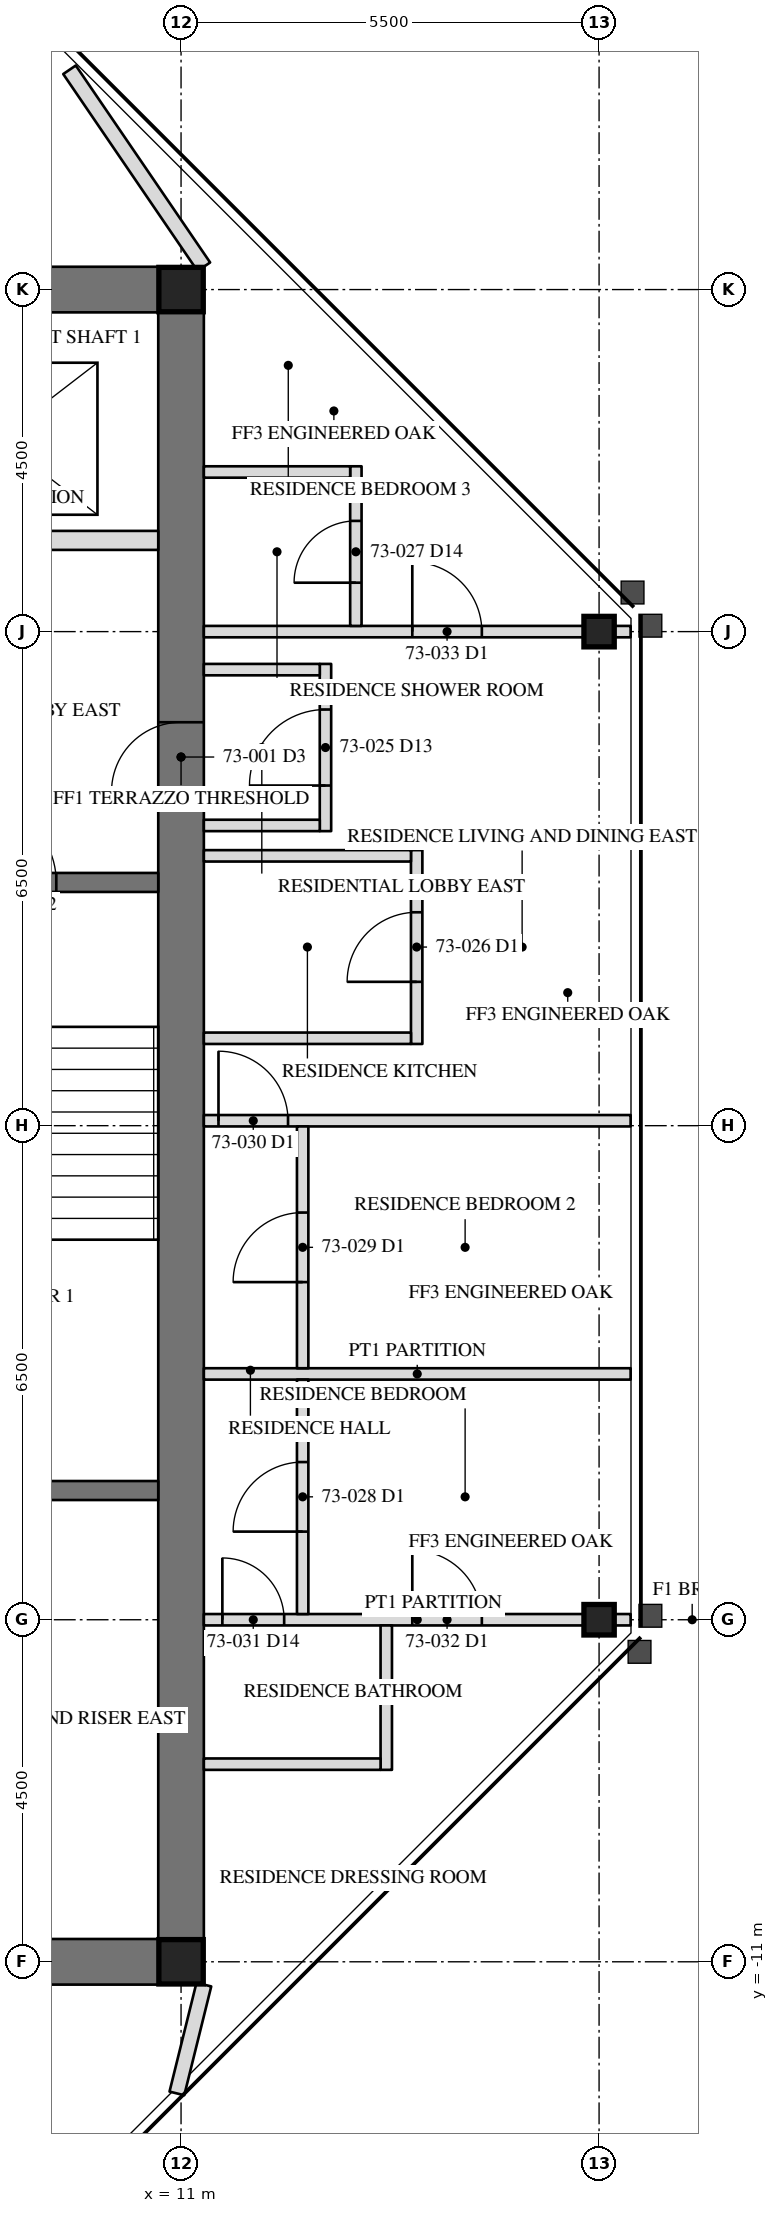
"""IFC4 building model, lengths in metres.
Left out: names, types, materials, properties, quantities, classifications, styles, units other than length and angle.
Written with IfcOpenShell. Run it as: python <this file> out.ifc"""

import sys

from ifc_helpers import new_model, si_unit, direction, frame, frame_2d, origin, origin_2d, place, context, subcontext, project, spatial, rectangle, hollow_rectangle, i_section, extrude, element, fill, save


model = new_model("IFC4")
c1 = context("Model", 3, precision=1e-05, world=origin(), true_north=direction((0.0, 1.0)))
c2 = subcontext(c1, "Body", "Model", "MODEL_VIEW")
j1 = project(units=[si_unit("LENGTHUNIT", "METRE"), si_unit("PLANEANGLEUNIT", "RADIAN")], contexts=[c1])
p1 = place(None, origin())
s1 = spatial("IfcSite", under=j1, at=p1, CompositionType="ELEMENT")
p2 = place(p1, origin())
s2 = spatial("IfcBuilding", under=s1, at=p2, CompositionType="ELEMENT")
p3 = place(p2, frame((0.0, 0.0, 295.6)))
s3 = spatial("IfcBuildingStorey", under=s2, at=p3, CompositionType="ELEMENT", Elevation=295.6)
for number, where, z_axis, x_axis in (
    (1, (16.5, -6.5, 0.0), (0.0, 0.0, 1.0), (0.0, 1.0, 0.0)),
    (2, (16.5, 6.5, 0.0), (0.0, 0.0, 1.0), (0.0, 1.0, 0.0)),
):
    element("IfcColumn", number, at=place(p3, frame(where, z_axis=z_axis, x_axis=x_axis)), inside=s3, PredefinedType="COLUMN", context=c2, shape_type="SweptSolid", body=[
        extrude(i_section(OverallWidth=0.401, OverallDepth=0.399, WebThickness=0.025, FlangeThickness=0.04, at=origin_2d()), origin(), (0.0, 0.0, 1.0), 3.6),
    ])
p4 = place(p3, frame((11.0, -11.0, 0.0), z_axis=(0.0, 0.0, 1.0), x_axis=(0.0, 1.0, 0.0)))
e3 = element("IfcWall", 3, at=p4, inside=s3, PredefinedType="SHEAR", context=c2, shape_type="SweptSolid", body=[
    extrude(rectangle(XDim=22.0, YDim=0.6, at=frame_2d((11.0, 0.0))), origin(), (0.0, 0.0, 1.0), 3.6),
])
p5 = place(p4, frame((15.393, 0.0, 0.0)))
e4 = element("IfcOpeningElement", 4, at=p5, cuts=e3, PredefinedType="OPENING", context=c2, shape_type="SweptSolid", body=[
    extrude(rectangle(XDim=0.915, YDim=2.134, at=frame_2d((0.458, 1.067))), frame((0.0, 0.31, 0.0), z_axis=(0.0, -1.0, 0.0), x_axis=(1.0, 0.0, 0.0)), (0.0, 0.0, 1.0), 0.62),
])
for number, where, z_axis, x_axis in (
    (5, (11.0, 11.0, 0.0), (0.0, 0.0, 1.0), (-1.0, 0.0, 0.0)),
    (6, (6.5, -11.0, 0.0), (0.0, 0.0, 1.0), (1.0, 0.0, 0.0)),
):
    element("IfcWall", number, at=place(p3, frame(where, z_axis=z_axis, x_axis=x_axis)), inside=s3, PredefinedType="SHEAR", context=c2, shape_type="SweptSolid", body=[
        extrude(rectangle(XDim=4.5, YDim=0.6, at=frame_2d((2.25, 0.0))), origin(), (0.0, 0.0, 1.0), 3.6),
    ])
for number, where, z_axis, x_axis in (
    (7, (11.0, 11.0, 0.0), (0.0, 0.0, 1.0), (1.0, 0.0, 0.0)),
    (8, (11.0, -11.0, 0.0), (0.0, 0.0, 1.0), (1.0, 0.0, 0.0)),
):
    element("IfcColumn", number, at=place(p3, frame(where, z_axis=z_axis, x_axis=x_axis)), inside=s3, PredefinedType="COLUMN", context=c2, shape_type="SweptSolid", body=[
        extrude(hollow_rectangle(XDim=0.584, YDim=0.584, WallThickness=0.051, at=origin_2d()), origin(), (0.0, 0.0, 1.0), 3.6),
    ])
p6 = place(p3, frame((6.95, -4.8, 0.0), z_axis=(0.0, 0.0, 1.0), x_axis=(1.0, 0.0, 0.0)))
e9 = element("IfcWall", 9, at=p6, inside=s3, PredefinedType="SOLIDWALL", context=c2, shape_type="SweptSolid", body=[
    extrude(rectangle(XDim=3.75, YDim=0.25, at=frame_2d((1.875, 0.0))), origin(), (0.0, 0.0, 1.0), 3.41),
])
p7 = place(p3, frame((6.95, 3.2, 0.0), z_axis=(0.0, 0.0, 1.0), x_axis=(1.0, 0.0, 0.0)))
e10 = element("IfcWall", 10, at=p7, inside=s3, PredefinedType="SOLIDWALL", context=c2, shape_type="SweptSolid", body=[
    extrude(rectangle(XDim=3.75, YDim=0.25, at=frame_2d((1.875, 0.0))), origin(), (0.0, 0.0, 1.0), 3.41),
])
p8 = place(p7, frame((1.342, 0.0, 0.0)))
e11 = element("IfcOpeningElement", 11, at=p8, cuts=e10, PredefinedType="OPENING", context=c2, shape_type="SweptSolid", body=[
    extrude(rectangle(XDim=1.067, YDim=2.134, at=frame_2d((0.533, 1.067))), frame((0.0, 0.135, 0.0), z_axis=(0.0, -1.0, 0.0), x_axis=(1.0, 0.0, 0.0)), (0.0, 0.0, 1.0), 0.27),
])
p9 = place(p3, frame((6.95, 7.7, 0.0), z_axis=(0.0, 0.0, 1.0), x_axis=(1.0, 0.0, 0.0)))
e12 = element("IfcWall", 12, at=p9, inside=s3, PredefinedType="PARTITIONING", context=c2, shape_type="SweptSolid", body=[
    extrude(rectangle(XDim=3.75, YDim=0.25, at=frame_2d((1.875, 0.0))), origin(), (0.0, 0.0, 1.0), 3.41),
])
p10 = place(p9, frame((0.45, 0.0, 0.0)))
e13 = element("IfcOpeningElement", 13, at=p10, cuts=e12, PredefinedType="OPENING", context=c2, shape_type="SweptSolid", body=[
    extrude(rectangle(XDim=1.219, YDim=2.134, at=frame_2d((0.609, 1.067))), frame((0.0, 0.135, 0.0), z_axis=(0.0, -1.0, 0.0), x_axis=(1.0, 0.0, 0.0)), (0.0, 0.0, 1.0), 0.27),
])
p11 = place(p3, frame((11.3, 11.3, 0.0), z_axis=(0.0, 0.0, 1.0), x_axis=(-0.563469639691, 0.826136771453, 0.0)))
e14 = element("IfcWall", 14, at=p11, inside=s3, PredefinedType="PARTITIONING", context=c2, shape_type="SweptSolid", body=[
    extrude(rectangle(XDim=3.137, YDim=0.2, at=frame_2d((1.568, 0.0))), origin(), (0.0, 0.0, 1.0), 2.704),
])
p12 = place(p3, frame((11.3, -11.3, 0.0), z_axis=(0.0, 0.0, 1.0), x_axis=(-0.24050983258, -0.970646702169, 0.0)))
e15 = element("IfcWall", 15, at=p12, inside=s3, PredefinedType="PARTITIONING", context=c2, shape_type="SweptSolid", body=[
    extrude(rectangle(XDim=1.475, YDim=0.2, at=frame_2d((0.737, 0.0))), origin(), (0.0, 0.0, 1.0), 3.41),
])
p13 = place(p3, frame((11.3, -6.5, 0.0), z_axis=(0.0, 0.0, 1.0), x_axis=(1.0, 0.0, 0.0)))
e16 = element("IfcWall", 16, at=p13, inside=s3, PredefinedType="PARTITIONING", context=c2, shape_type="SweptSolid", body=[
    extrude(rectangle(XDim=5.615, YDim=0.15, at=frame_2d((2.808, 0.0))), origin(), (0.0, 0.0, 1.0), 2.966),
])
p14 = place(p13, frame((0.243, 0.0, 0.0)))
e17 = element("IfcOpeningElement", 17, at=p14, cuts=e16, PredefinedType="OPENING", context=c2, shape_type="SweptSolid", body=[
    extrude(rectangle(XDim=0.813, YDim=2.032, at=frame_2d((0.406, 1.016))), frame((0.0, 0.085, 0.0), z_axis=(0.0, -1.0, 0.0), x_axis=(1.0, 0.0, 0.0)), (0.0, 0.0, 1.0), 0.17),
])
p15 = place(p13, frame((2.742, 0.0, 0.0)))
e18 = element("IfcOpeningElement", 18, at=p15, cuts=e16, PredefinedType="OPENING", context=c2, shape_type="SweptSolid", body=[
    extrude(rectangle(XDim=0.915, YDim=2.134, at=frame_2d((0.458, 1.067))), frame((0.0, 0.085, 0.0), z_axis=(0.0, -1.0, 0.0), x_axis=(1.0, 0.0, 0.0)), (0.0, 0.0, 1.0), 0.17),
])
p16 = place(p3, frame((11.3, -3.266, 0.0), z_axis=(0.0, 0.0, 1.0), x_axis=(1.0, 0.0, 0.0)))
e19 = element("IfcWall", 19, at=p16, inside=s3, PredefinedType="PARTITIONING", context=c2, shape_type="SweptSolid", body=[
    extrude(rectangle(XDim=5.615, YDim=0.15, at=frame_2d((2.808, 0.0))), origin(), (0.0, 0.0, 1.0), 2.709),
])
p17 = place(p3, frame((11.3, 0.065, 0.0), z_axis=(0.0, 0.0, 1.0), x_axis=(1.0, 0.0, 0.0)))
e20 = element("IfcWall", 20, at=p17, inside=s3, PredefinedType="PARTITIONING", context=c2, shape_type="SweptSolid", body=[
    extrude(rectangle(XDim=5.615, YDim=0.15, at=frame_2d((2.808, 0.0))), origin(), (0.0, 0.0, 1.0), 2.709),
])
p18 = place(p17, frame((0.192, 0.0, 0.0)))
e21 = element("IfcOpeningElement", 21, at=p18, cuts=e20, PredefinedType="OPENING", context=c2, shape_type="SweptSolid", body=[
    extrude(rectangle(XDim=0.915, YDim=2.134, at=frame_2d((0.458, 1.067))), frame((0.0, 0.085, 0.0), z_axis=(0.0, -1.0, 0.0), x_axis=(1.0, 0.0, 0.0)), (0.0, 0.0, 1.0), 0.17),
])
p19 = place(p3, frame((11.3, 6.5, 0.0), z_axis=(0.0, 0.0, 1.0), x_axis=(1.0, 0.0, 0.0)))
e22 = element("IfcWall", 22, at=p19, inside=s3, PredefinedType="PARTITIONING", context=c2, shape_type="SweptSolid", body=[
    extrude(rectangle(XDim=5.615, YDim=0.15, at=frame_2d((2.808, 0.0))), origin(), (0.0, 0.0, 1.0), 2.966),
])
p20 = place(p19, frame((2.742, 0.0, 0.0)))
e23 = element("IfcOpeningElement", 23, at=p20, cuts=e22, PredefinedType="OPENING", context=c2, shape_type="SweptSolid", body=[
    extrude(rectangle(XDim=0.915, YDim=2.134, at=frame_2d((0.458, 1.067))), frame((0.0, 0.085, 0.0), z_axis=(0.0, -1.0, 0.0), x_axis=(1.0, 0.0, 0.0)), (0.0, 0.0, 1.0), 0.17),
])
p21 = place(p3, frame((12.9, 3.875, 0.0), z_axis=(0.0, 0.0, 1.0), x_axis=(0.0, 1.0, 0.0)))
e24 = element("IfcWall", 24, at=p21, inside=s3, PredefinedType="PARTITIONING", context=c2, shape_type="SweptSolid", body=[
    extrude(rectangle(XDim=2.2, YDim=0.15, at=frame_2d((1.1, 0.0))), origin(), (0.0, 0.0, 1.0), 3.41),
])
p22 = place(p21, frame((0.6, 0.0, 0.0)))
e25 = element("IfcOpeningElement", 25, at=p22, cuts=e24, PredefinedType="OPENING", context=c2, shape_type="SweptSolid", body=[
    extrude(rectangle(XDim=1.0, YDim=2.134, at=frame_2d((0.5, 1.067))), frame((0.0, 0.085, 0.0), z_axis=(0.0, -1.0, 0.0), x_axis=(1.0, 0.0, 0.0)), (0.0, 0.0, 1.0), 0.17),
])
for number, where, z_axis, x_axis in (
    (26, (11.3, 3.95, 0.0), (0.0, 0.0, 1.0), (1.0, 0.0, 0.0)),
    (27, (11.3, 6.0, 0.0), (0.0, 0.0, 1.0), (1.0, 0.0, 0.0)),
):
    element("IfcWall", number, at=place(p3, frame(where, z_axis=z_axis, x_axis=x_axis)), inside=s3, PredefinedType="PARTITIONING", context=c2, shape_type="SweptSolid", body=[
        extrude(rectangle(XDim=1.525, YDim=0.15, at=frame_2d((0.762, 0.0))), origin(), (0.0, 0.0, 1.0), 3.41),
    ])
p23 = place(p3, frame((14.1, 1.075, 0.0), z_axis=(0.0, 0.0, 1.0), x_axis=(0.0, 1.0, 0.0)))
e28 = element("IfcWall", 28, at=p23, inside=s3, PredefinedType="PARTITIONING", context=c2, shape_type="SweptSolid", body=[
    extrude(rectangle(XDim=2.55, YDim=0.15, at=frame_2d((1.275, 0.0))), origin(), (0.0, 0.0, 1.0), 3.41),
])
p24 = place(p23, frame((0.817, 0.0, 0.0)))
e29 = element("IfcOpeningElement", 29, at=p24, cuts=e28, PredefinedType="OPENING", context=c2, shape_type="SweptSolid", body=[
    extrude(rectangle(XDim=0.915, YDim=2.134, at=frame_2d((0.458, 1.067))), frame((0.0, 0.085, 0.0), z_axis=(0.0, -1.0, 0.0), x_axis=(1.0, 0.0, 0.0)), (0.0, 0.0, 1.0), 0.17),
])
for number, where, z_axis, x_axis in (
    (30, (11.3, 1.15, 0.0), (0.0, 0.0, 1.0), (1.0, 0.0, 0.0)),
    (31, (11.3, 3.55, 0.0), (0.0, 0.0, 1.0), (1.0, 0.0, 0.0)),
):
    element("IfcWall", number, at=place(p3, frame(where, z_axis=z_axis, x_axis=x_axis)), inside=s3, PredefinedType="PARTITIONING", context=c2, shape_type="SweptSolid", body=[
        extrude(rectangle(XDim=2.725, YDim=0.15, at=frame_2d((1.362, 0.0))), origin(), (0.0, 0.0, 1.0), 3.41),
    ])
p25 = place(p3, frame((13.3, 6.575, 0.0), z_axis=(0.0, 0.0, 1.0), x_axis=(0.0, 1.0, 0.0)))
e32 = element("IfcWall", 32, at=p25, inside=s3, PredefinedType="PARTITIONING", context=c2, shape_type="SweptSolid", body=[
    extrude(rectangle(XDim=2.1, YDim=0.15, at=frame_2d((1.05, 0.0))), origin(), (0.0, 0.0, 1.0), 3.41),
])
p26 = place(p25, frame((0.569, 0.0, 0.0)))
e33 = element("IfcOpeningElement", 33, at=p26, cuts=e32, PredefinedType="OPENING", context=c2, shape_type="SweptSolid", body=[
    extrude(rectangle(XDim=0.813, YDim=2.032, at=frame_2d((0.406, 1.016))), frame((0.0, 0.085, 0.0), z_axis=(0.0, -1.0, 0.0), x_axis=(1.0, 0.0, 0.0)), (0.0, 0.0, 1.0), 0.17),
])
p27 = place(p3, frame((11.3, 8.6, 0.0), z_axis=(0.0, 0.0, 1.0), x_axis=(1.0, 0.0, 0.0)))
e34 = element("IfcWall", 34, at=p27, inside=s3, PredefinedType="PARTITIONING", context=c2, shape_type="SweptSolid", body=[
    extrude(rectangle(XDim=1.925, YDim=0.15, at=frame_2d((0.962, 0.0))), origin(), (0.0, 0.0, 1.0), 3.41),
])
p28 = place(p3, frame((12.6, -6.425, 0.0), z_axis=(0.0, 0.0, 1.0), x_axis=(0.0, 1.0, 0.0)))
e35 = element("IfcWall", 35, at=p28, inside=s3, PredefinedType="PARTITIONING", context=c2, shape_type="SweptSolid", body=[
    extrude(rectangle(XDim=3.084, YDim=0.15, at=frame_2d((1.542, 0.0))), origin(), (0.0, 0.0, 1.0), 3.41),
])
p29 = place(p28, frame((1.084, 0.0, 0.0)))
e36 = element("IfcOpeningElement", 36, at=p29, cuts=e35, PredefinedType="OPENING", context=c2, shape_type="SweptSolid", body=[
    extrude(rectangle(XDim=0.915, YDim=2.134, at=frame_2d((0.458, 1.067))), frame((0.0, 0.085, 0.0), z_axis=(0.0, -1.0, 0.0), x_axis=(1.0, 0.0, 0.0)), (0.0, 0.0, 1.0), 0.17),
])
p30 = place(p3, frame((12.6, -3.191, 0.0), z_axis=(0.0, 0.0, 1.0), x_axis=(0.0, 1.0, 0.0)))
e37 = element("IfcWall", 37, at=p30, inside=s3, PredefinedType="PARTITIONING", context=c2, shape_type="SweptSolid", body=[
    extrude(rectangle(XDim=3.181, YDim=0.15, at=frame_2d((1.59, 0.0))), origin(), (0.0, 0.0, 1.0), 3.41),
])
p31 = place(p30, frame((1.133, 0.0, 0.0)))
e38 = element("IfcOpeningElement", 38, at=p31, cuts=e37, PredefinedType="OPENING", context=c2, shape_type="SweptSolid", body=[
    extrude(rectangle(XDim=0.915, YDim=2.134, at=frame_2d((0.458, 1.067))), frame((0.0, 0.085, 0.0), z_axis=(0.0, -1.0, 0.0), x_axis=(1.0, 0.0, 0.0)), (0.0, 0.0, 1.0), 0.17),
])
p32 = place(p3, frame((13.7, -6.575, 0.0), z_axis=(0.0, 0.0, 1.0), x_axis=(0.0, -1.0, 0.0)))
e39 = element("IfcWall", 39, at=p32, inside=s3, PredefinedType="PARTITIONING", context=c2, shape_type="SweptSolid", body=[
    extrude(rectangle(XDim=1.9, YDim=0.15, at=frame_2d((0.95, 0.0))), origin(), (0.0, 0.0, 1.0), 3.41),
])
p33 = place(p3, frame((11.3, -8.4, 0.0), z_axis=(0.0, 0.0, 1.0), x_axis=(1.0, 0.0, 0.0)))
e40 = element("IfcWall", 40, at=p33, inside=s3, PredefinedType="PARTITIONING", context=c2, shape_type="SweptSolid", body=[
    extrude(rectangle(XDim=2.325, YDim=0.15, at=frame_2d((1.163, 0.0))), origin(), (0.0, 0.0, 1.0), 3.41),
])
p34 = place(p5, origin())
e41 = element("IfcDoor", 41, at=p34, inside=s3, OperationType="SINGLE_SWING_RIGHT", PredefinedType="DOOR", context=c2, shape_type="SweptSolid", body=[
    extrude(rectangle(XDim=0.915, YDim=2.134, at=frame_2d((0.458, 1.067))), frame((0.0, -0.225, 0.0), z_axis=(0.0, -1.0, 0.0), x_axis=(1.0, 0.0, 0.0)), (0.0, 0.0, 1.0), 0.05),
])
fill(e4, e41)
p35 = place(p8, origin())
e42 = element("IfcDoor", 42, at=p35, inside=s3, OperationType="SINGLE_SWING_LEFT", PredefinedType="DOOR", context=c2, shape_type="SweptSolid", body=[
    extrude(rectangle(XDim=1.067, YDim=2.134, at=frame_2d((0.533, 1.067))), frame((0.0, 0.025, 0.0), z_axis=(0.0, -1.0, 0.0), x_axis=(1.0, 0.0, 0.0)), (0.0, 0.0, 1.0), 0.05),
])
fill(e11, e42)
p36 = place(p22, origin())
e43 = element("IfcDoor", 43, at=p36, inside=s3, OperationType="SINGLE_SWING_RIGHT", PredefinedType="DOOR", context=c2, shape_type="SweptSolid", body=[
    extrude(rectangle(XDim=1.0, YDim=2.134, at=frame_2d((0.5, 1.067))), frame((0.0, 0.025, 0.0), z_axis=(0.0, -1.0, 0.0), x_axis=(1.0, 0.0, 0.0)), (0.0, 0.0, 1.0), 0.05),
])
fill(e25, e43)
p37 = place(p24, origin())
e44 = element("IfcDoor", 44, at=p37, inside=s3, OperationType="SINGLE_SWING_LEFT", PredefinedType="DOOR", context=c2, shape_type="SweptSolid", body=[
    extrude(rectangle(XDim=0.915, YDim=2.134, at=frame_2d((0.458, 1.067))), frame((0.0, 0.025, 0.0), z_axis=(0.0, -1.0, 0.0), x_axis=(1.0, 0.0, 0.0)), (0.0, 0.0, 1.0), 0.05),
])
fill(e29, e44)
p38 = place(p26, origin())
e45 = element("IfcDoor", 45, at=p38, inside=s3, OperationType="SINGLE_SWING_LEFT", PredefinedType="DOOR", context=c2, shape_type="SweptSolid", body=[
    extrude(rectangle(XDim=0.813, YDim=2.032, at=frame_2d((0.406, 1.016))), frame((0.0, 0.025, 0.0), z_axis=(0.0, -1.0, 0.0), x_axis=(1.0, 0.0, 0.0)), (0.0, 0.0, 1.0), 0.05),
])
fill(e33, e45)
p39 = place(p29, origin())
e46 = element("IfcDoor", 46, at=p39, inside=s3, OperationType="SINGLE_SWING_LEFT", PredefinedType="DOOR", context=c2, shape_type="SweptSolid", body=[
    extrude(rectangle(XDim=0.915, YDim=2.134, at=frame_2d((0.458, 1.067))), frame((0.0, 0.025, 0.0), z_axis=(0.0, -1.0, 0.0), x_axis=(1.0, 0.0, 0.0)), (0.0, 0.0, 1.0), 0.05),
])
fill(e36, e46)
p40 = place(p31, origin())
e47 = element("IfcDoor", 47, at=p40, inside=s3, OperationType="SINGLE_SWING_LEFT", PredefinedType="DOOR", context=c2, shape_type="SweptSolid", body=[
    extrude(rectangle(XDim=0.915, YDim=2.134, at=frame_2d((0.458, 1.067))), frame((0.0, 0.025, 0.0), z_axis=(0.0, -1.0, 0.0), x_axis=(1.0, 0.0, 0.0)), (0.0, 0.0, 1.0), 0.05),
])
fill(e38, e47)
p41 = place(p18, origin())
e48 = element("IfcDoor", 48, at=p41, inside=s3, OperationType="SINGLE_SWING_LEFT", PredefinedType="DOOR", context=c2, shape_type="SweptSolid", body=[
    extrude(rectangle(XDim=0.915, YDim=2.134, at=frame_2d((0.458, 1.067))), frame((0.0, 0.025, 0.0), z_axis=(0.0, -1.0, 0.0), x_axis=(1.0, 0.0, 0.0)), (0.0, 0.0, 1.0), 0.05),
])
fill(e21, e48)
p42 = place(p14, origin())
e49 = element("IfcDoor", 49, at=p42, inside=s3, OperationType="SINGLE_SWING_LEFT", PredefinedType="DOOR", context=c2, shape_type="SweptSolid", body=[
    extrude(rectangle(XDim=0.813, YDim=2.032, at=frame_2d((0.406, 1.016))), frame((0.0, 0.025, 0.0), z_axis=(0.0, -1.0, 0.0), x_axis=(1.0, 0.0, 0.0)), (0.0, 0.0, 1.0), 0.05),
])
fill(e17, e49)
p43 = place(p15, origin())
e50 = element("IfcDoor", 50, at=p43, inside=s3, OperationType="SINGLE_SWING_LEFT", PredefinedType="DOOR", context=c2, shape_type="SweptSolid", body=[
    extrude(rectangle(XDim=0.915, YDim=2.134, at=frame_2d((0.458, 1.067))), frame((0.0, 0.025, 0.0), z_axis=(0.0, -1.0, 0.0), x_axis=(1.0, 0.0, 0.0)), (0.0, 0.0, 1.0), 0.05),
])
fill(e18, e50)
p44 = place(p20, origin())
e51 = element("IfcDoor", 51, at=p44, inside=s3, OperationType="SINGLE_SWING_LEFT", PredefinedType="DOOR", context=c2, shape_type="SweptSolid", body=[
    extrude(rectangle(XDim=0.915, YDim=2.134, at=frame_2d((0.458, 1.067))), frame((0.0, 0.025, 0.0), z_axis=(0.0, -1.0, 0.0), x_axis=(1.0, 0.0, 0.0)), (0.0, 0.0, 1.0), 0.05),
])
fill(e23, e51)
save(model, sys.argv[1])
